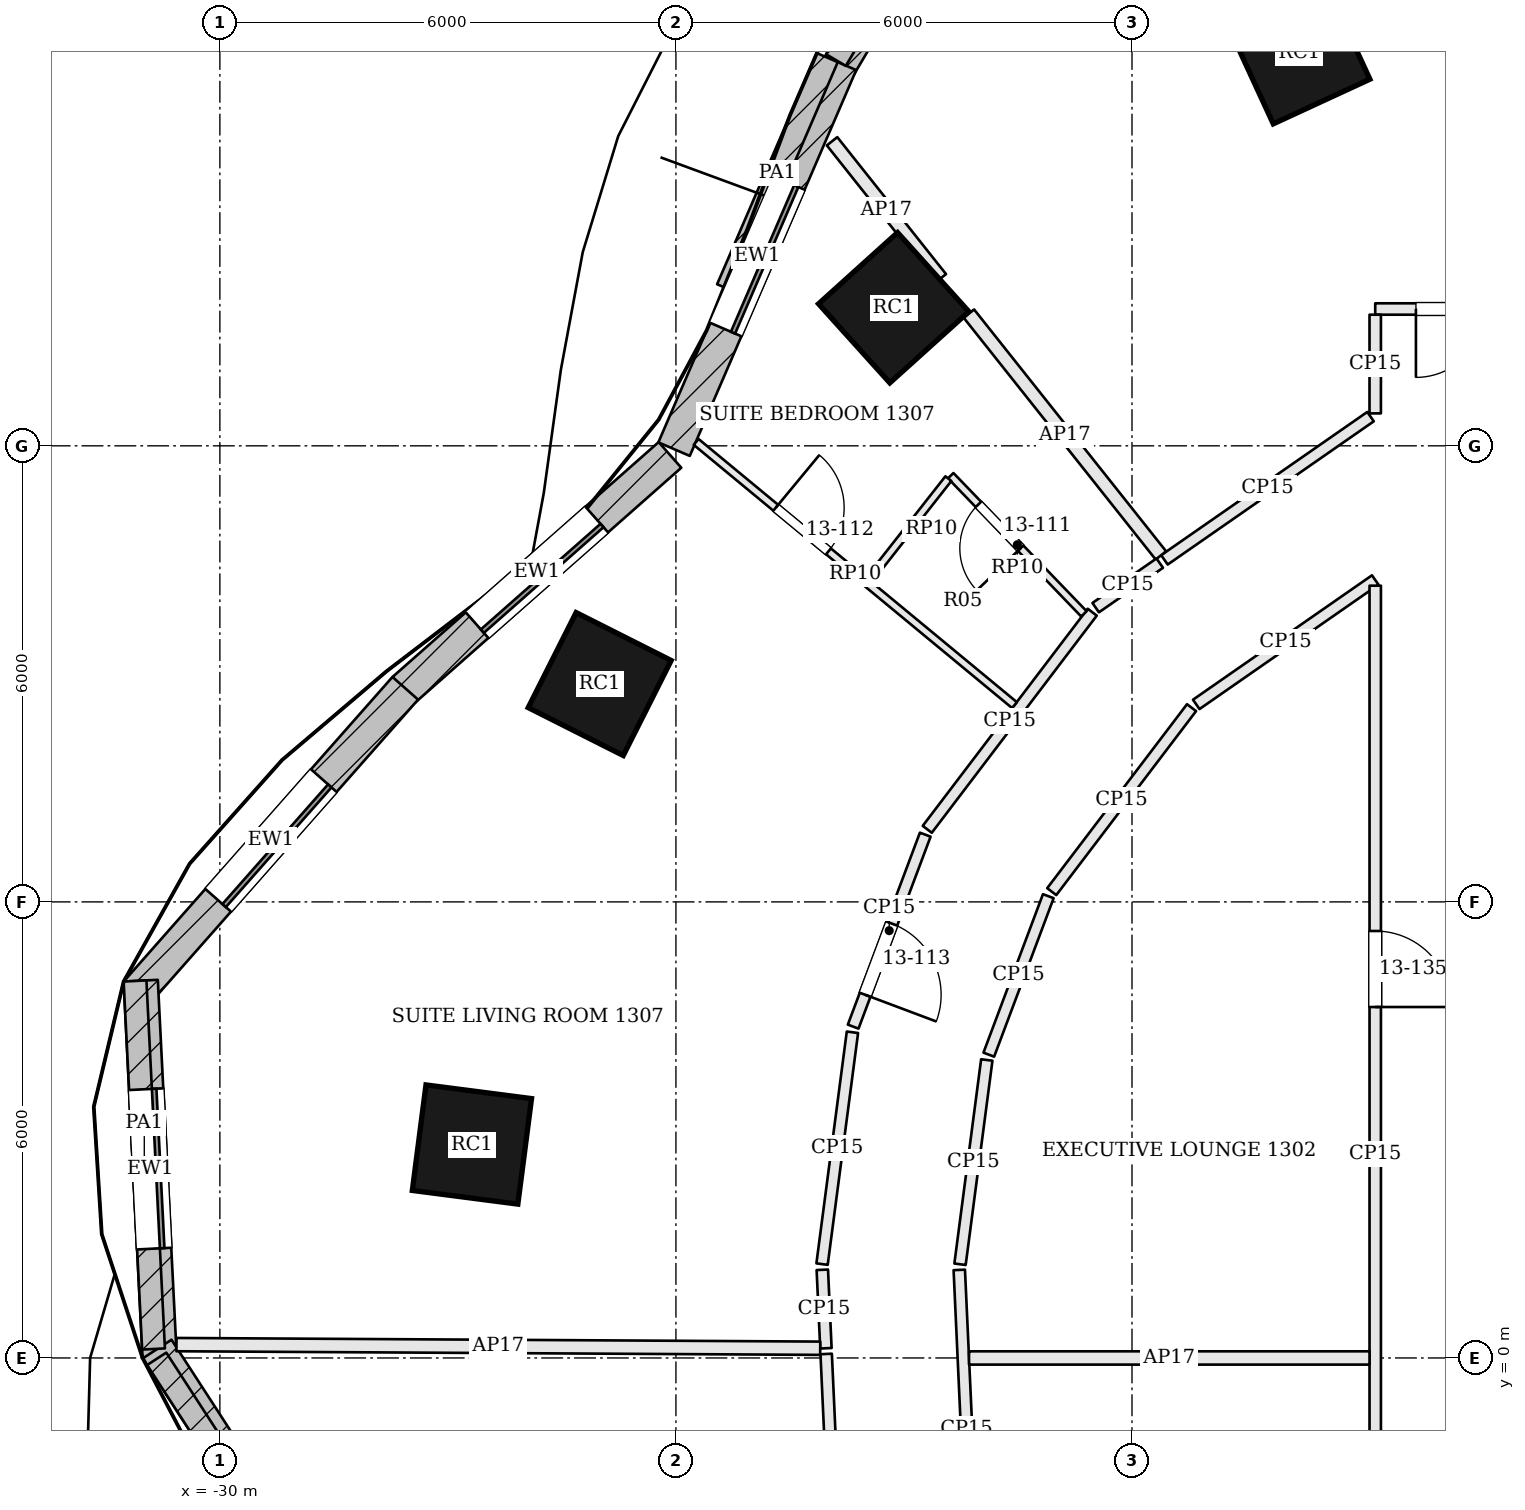
"""IFC4 building model, lengths in metres.
Left out: names, types, materials, properties, quantities, classifications, styles, units other than length and angle.
Written with IfcOpenShell. Run it as: python <this file> out.ifc"""

import sys

from ifc_helpers import new_model, si_unit, direction, frame, frame_2d, origin, origin_2d, place, context, subcontext, project, spatial, rectangle, extrude, element, fill, save


model = new_model("IFC4")
c1 = context("Model", 3, precision=1e-05, world=origin(), true_north=direction((0.0, 1.0)))
c2 = subcontext(c1, "Body", "Model", "MODEL_VIEW")
j1 = project(units=[si_unit("LENGTHUNIT", "METRE"), si_unit("PLANEANGLEUNIT", "RADIAN")], contexts=[c1])
p1 = place(None, origin())
s1 = spatial("IfcSite", under=j1, at=p1, CompositionType="ELEMENT")
p2 = place(p1, origin())
s2 = spatial("IfcBuilding", under=s1, at=p2, CompositionType="ELEMENT")
p3 = place(p2, frame((0.0, 0.0, 62.7)))
s3 = spatial("IfcBuildingStorey", under=s2, at=p3, CompositionType="ELEMENT", Elevation=62.7)
for number, where, z_axis, x_axis in (
    (1, (-15.799, 17.165, 0.0), (0.0, 0.0, 1.0), (-0.908, -0.419, 0.0)),
    (2, (-21.135, 13.817, 0.0), (0.0, 0.0, 1.0), (-0.743, -0.67, 0.0)),
    (3, (-25.003, 8.866, 0.0), (0.0, 0.0, 1.0), (-0.45, -0.893, 0.0)),
    (4, (-26.684, 2.808, 0.0), (0.0, 0.0, 1.0), (-0.128, -0.992, 0.0)),
):
    element("IfcColumn", number, at=place(p3, frame(where, z_axis=z_axis, x_axis=x_axis)), inside=s3, PredefinedType="COLUMN", context=c2, shape_type="SweptSolid", body=[
        extrude(rectangle(XDim=1.4, YDim=1.4, at=origin_2d()), origin(), (0.0, 0.0, 1.0), 3.6),
    ])
p4 = place(p3, frame((-20.017, 20.096, 0.0), z_axis=(0.0, 0.0, 1.0), x_axis=(-0.509718522454, -0.860341227576, 0.0)))
e5 = element("IfcWall", 5, at=p4, inside=s3, PredefinedType="SOLIDWALL", context=c2, shape_type="SweptSolid", body=[
    extrude(rectangle(XDim=3.591, YDim=0.45, at=frame_2d((1.795, 0.0))), origin(), (0.0, 0.0, 1.0), 3.4),
])
p5 = place(p4, frame((0.896, 0.0, 0.9)))
e6 = element("IfcOpeningElement", 6, at=p5, cuts=e5, PredefinedType="OPENING", context=c2, shape_type="SweptSolid", body=[
    extrude(rectangle(XDim=1.8, YDim=2.0, at=frame_2d((0.9, 1.0))), frame((0.0, 0.235, 0.0), z_axis=(0.0, -1.0, 0.0), x_axis=(1.0, 0.0, 0.0)), (0.0, 0.0, 1.0), 0.47),
])
p6 = place(p3, frame((-21.835, 17.032, 0.0), z_axis=(0.0, 0.0, 1.0), x_axis=(-0.396103523022, -0.918205858753, 0.0)))
e7 = element("IfcWall", 7, at=p6, inside=s3, PredefinedType="SOLIDWALL", context=c2, shape_type="SweptSolid", body=[
    extrude(rectangle(XDim=5.528, YDim=0.45, at=frame_2d((2.764, 0.0))), origin(), (0.0, 0.0, 1.0), 3.4),
])
p7 = place(p6, frame((1.714, 0.0, 0.9)))
e8 = element("IfcOpeningElement", 8, at=p7, cuts=e7, PredefinedType="OPENING", context=c2, shape_type="SweptSolid", body=[
    extrude(rectangle(XDim=2.1, YDim=2.0, at=frame_2d((1.05, 1.0))), frame((0.0, 0.235, 0.0), z_axis=(0.0, -1.0, 0.0), x_axis=(1.0, 0.0, 0.0)), (0.0, 0.0, 1.0), 0.47),
])
p8 = place(p3, frame((-24.078, 11.88, 0.0), z_axis=(0.0, 0.0, 1.0), x_axis=(-0.749778352475, -0.661689067583, 0.0)))
e9 = element("IfcWall", 9, at=p8, inside=s3, PredefinedType="SOLIDWALL", context=c2, shape_type="SweptSolid", body=[
    extrude(rectangle(XDim=4.67, YDim=0.45, at=frame_2d((2.335, 0.0))), origin(), (0.0, 0.0, 1.0), 3.4),
])
p9 = place(p8, frame((1.285, 0.0, 0.9)))
e10 = element("IfcOpeningElement", 10, at=p9, cuts=e9, PredefinedType="OPENING", context=c2, shape_type="SweptSolid", body=[
    extrude(rectangle(XDim=2.1, YDim=2.0, at=frame_2d((1.05, 1.0))), frame((0.0, 0.235, 0.0), z_axis=(0.0, -1.0, 0.0), x_axis=(1.0, 0.0, 0.0)), (0.0, 0.0, 1.0), 0.47),
])
p10 = place(p3, frame((-27.561, 8.81, 0.0), z_axis=(0.0, 0.0, 1.0), x_axis=(-0.661706312809, -0.749763132989, 0.0)))
e11 = element("IfcWall", 11, at=p10, inside=s3, PredefinedType="SOLIDWALL", context=c2, shape_type="SweptSolid", body=[
    extrude(rectangle(XDim=5.34, YDim=0.45, at=frame_2d((2.67, 0.0))), origin(), (0.0, 0.0, 1.0), 3.4),
])
p11 = place(p10, frame((1.62, 0.0, 0.9)))
e12 = element("IfcOpeningElement", 12, at=p11, cuts=e11, PredefinedType="OPENING", context=c2, shape_type="SweptSolid", body=[
    extrude(rectangle(XDim=2.1, YDim=2.0, at=frame_2d((1.05, 1.0))), frame((0.0, 0.235, 0.0), z_axis=(0.0, -1.0, 0.0), x_axis=(1.0, 0.0, 0.0)), (0.0, 0.0, 1.0), 0.47),
])
p12 = place(p3, frame((-31.041, 4.963, 0.0), z_axis=(0.0, 0.0, 1.0), x_axis=(0.050222481563, -0.99873805492, 0.0)))
e13 = element("IfcWall", 13, at=p12, inside=s3, PredefinedType="SOLIDWALL", context=c2, shape_type="SweptSolid", body=[
    extrude(rectangle(XDim=4.958, YDim=0.45, at=frame_2d((2.479, 0.0))), origin(), (0.0, 0.0, 1.0), 3.4),
])
p13 = place(p12, frame((1.429, 0.0, 0.9)))
e14 = element("IfcOpeningElement", 14, at=p13, cuts=e13, PredefinedType="OPENING", context=c2, shape_type="SweptSolid", body=[
    extrude(rectangle(XDim=2.1, YDim=2.0, at=frame_2d((1.05, 1.0))), frame((0.0, 0.235, 0.0), z_axis=(0.0, -1.0, 0.0), x_axis=(1.0, 0.0, 0.0)), (0.0, 0.0, 1.0), 0.47),
])
p14 = place(p3, frame((-30.825, 0.117, 0.0), z_axis=(0.0, 0.0, 1.0), x_axis=(0.543975629516, -0.839101015666, 0.0)))
e15 = element("IfcWall", 15, at=p14, inside=s3, PredefinedType="SOLIDWALL", context=c2, shape_type="SweptSolid", body=[
    extrude(rectangle(XDim=5.281, YDim=0.45, at=frame_2d((2.641, 0.0))), origin(), (0.0, 0.0, 1.0), 3.4),
])
p15 = place(p14, frame((1.591, 0.0, 0.9)))
e16 = element("IfcOpeningElement", 16, at=p15, cuts=e15, PredefinedType="OPENING", context=c2, shape_type="SweptSolid", body=[
    extrude(rectangle(XDim=2.1, YDim=2.0, at=frame_2d((1.05, 1.0))), frame((0.0, 0.235, 0.0), z_axis=(0.0, -1.0, 0.0), x_axis=(1.0, 0.0, 0.0)), (0.0, 0.0, 1.0), 0.47),
])
p16 = place(p3, frame((-20.148, 20.023, 3.6), z_axis=(0.0, 0.0, 1.0), x_axis=(-0.509657876052, -0.860377155309, 0.0)))
e17 = element("IfcWall", 17, at=p16, inside=s3, PredefinedType="PARAPET", context=c2, shape_type="SweptSolid", body=[
    extrude(rectangle(XDim=3.427, YDim=0.3, at=frame_2d((1.713, 0.0))), origin(), (0.0, 0.0, 1.0), 1.1),
])
p17 = place(p3, frame((-22.009, 17.107, 3.6), z_axis=(0.0, 0.0, 1.0), x_axis=(-0.396142292889, -0.918189132905, 0.0)))
e18 = element("IfcWall", 18, at=p17, inside=s3, PredefinedType="PARAPET", context=c2, shape_type="SweptSolid", body=[
    extrude(rectangle(XDim=3.312, YDim=0.3, at=frame_2d((1.656, 0.0))), origin(), (0.0, 0.0, 1.0), 1.1),
])
p18 = place(p3, frame((-31.116, 4.959, 3.6), z_axis=(0.0, 0.0, 1.0), x_axis=(0.05021140618, -0.998738611795, 0.0)))
e19 = element("IfcWall", 19, at=p18, inside=s3, PredefinedType="PARAPET", context=c2, shape_type="SweptSolid", body=[
    extrude(rectangle(XDim=4.848, YDim=0.3, at=frame_2d((2.424, 0.0))), origin(), (0.0, 0.0, 1.0), 1.1),
])
p19 = place(p3, frame((-30.831, -0.011, 3.6), z_axis=(0.0, 0.0, 1.0), x_axis=(0.543918219167, -0.839138231079, 0.0)))
e20 = element("IfcWall", 20, at=p19, inside=s3, PredefinedType="PARAPET", context=c2, shape_type="SweptSolid", body=[
    extrude(rectangle(XDim=5.174, YDim=0.3, at=frame_2d((2.587, 0.0))), origin(), (0.0, 0.0, 1.0), 1.1),
])
p20 = place(p3, frame((-11.464, 13.8, 0.0), z_axis=(0.0, 0.0, 1.0), x_axis=(-1.0, 0.0, 0.0)))
e21 = element("IfcWall", 21, at=p20, inside=s3, PredefinedType="PARTITIONING", context=c2, shape_type="SweptSolid", body=[
    extrude(rectangle(XDim=3.336, YDim=0.15, at=frame_2d((1.668, 0.0))), origin(), (0.0, 0.0, 1.0), 2.68),
])
p21 = place(p20, frame((1.0, 0.0, 0.0)))
e22 = element("IfcOpeningElement", 22, at=p21, cuts=e21, PredefinedType="OPENING", context=c2, shape_type="SweptSolid", body=[
    extrude(rectangle(XDim=1.8, YDim=2.1, at=frame_2d((0.9, 1.05))), frame((0.0, 0.085, 0.0), z_axis=(0.0, -1.0, 0.0), x_axis=(1.0, 0.0, 0.0)), (0.0, 0.0, 1.0), 0.17),
])
p22 = place(p3, frame((-14.8, 13.725, 0.0), z_axis=(0.0, 0.0, 1.0), x_axis=(-0.000188040613, -0.99999998232, 0.0)))
e23 = element("IfcWall", 23, at=p22, inside=s3, PredefinedType="PARTITIONING", context=c2, shape_type="SweptSolid", body=[
    extrude(rectangle(XDim=1.298, YDim=0.15, at=frame_2d((0.649, 0.0))), origin(), (0.0, 0.0, 1.0), 2.68),
])
p23 = place(p3, frame((-14.862, 12.384, 0.0), z_axis=(0.0, 0.0, 1.0), x_axis=(-0.821144742038, -0.570719994939, 0.0)))
e24 = element("IfcWall", 24, at=p23, inside=s3, PredefinedType="PARTITIONING", context=c2, shape_type="SweptSolid", body=[
    extrude(rectangle(XDim=3.302, YDim=0.15, at=frame_2d((1.651, 0.0))), origin(), (0.0, 0.0, 1.0), 2.68),
])
p24 = place(p3, frame((-21.946, 16.007, 0.0), z_axis=(0.0, 0.0, 1.0), x_axis=(0.621870662711, -0.783119964539, 0.0)))
e25 = element("IfcWall", 25, at=p24, inside=s3, PredefinedType="PARTITIONING", context=c2, shape_type="SweptSolid", body=[
    extrude(rectangle(XDim=2.301, YDim=0.175, at=frame_2d((1.151, 0.0))), origin(), (0.0, 0.0, 1.0), 2.68),
])
p25 = place(p3, frame((-20.146, 13.74, 0.0), z_axis=(0.0, 0.0, 1.0), x_axis=(0.621832273855, -0.783150447355, 0.0)))
e26 = element("IfcWall", 26, at=p25, inside=s3, PredefinedType="PARTITIONING", context=c2, shape_type="SweptSolid", body=[
    extrude(rectangle(XDim=4.062, YDim=0.175, at=frame_2d((2.031, 0.0))), origin(), (0.0, 0.0, 1.0), 2.68),
])
p26 = place(p3, frame((-17.635, 10.457, 0.0), z_axis=(0.0, 0.0, 1.0), x_axis=(-0.821171783561, -0.570681085969, 0.0)))
e27 = element("IfcWall", 27, at=p26, inside=s3, PredefinedType="PARTITIONING", context=c2, shape_type="SweptSolid", body=[
    extrude(rectangle(XDim=1.026, YDim=0.15, at=frame_2d((0.513, 0.0))), origin(), (0.0, 0.0, 1.0), 2.68),
])
p27 = place(p3, frame((-18.523, 9.811, 0.0), z_axis=(0.0, 0.0, 1.0), x_axis=(-0.605040130963, -0.796194976073, 0.0)))
e28 = element("IfcWall", 28, at=p27, inside=s3, PredefinedType="PARTITIONING", context=c2, shape_type="SweptSolid", body=[
    extrude(rectangle(XDim=3.588, YDim=0.15, at=frame_2d((1.794, 0.0))), origin(), (0.0, 0.0, 1.0), 2.68),
])
p28 = place(p3, frame((-20.72, 6.885, 0.0), z_axis=(0.0, 0.0, 1.0), x_axis=(-0.351520142875, -0.936180318717, 0.0)))
e29 = element("IfcWall", 29, at=p28, inside=s3, PredefinedType="PARTITIONING", context=c2, shape_type="SweptSolid", body=[
    extrude(rectangle(XDim=2.698, YDim=0.15, at=frame_2d((1.349, 0.0))), origin(), (0.0, 0.0, 1.0), 2.68),
])
p29 = place(p28, frame((1.25, 0.0, 0.0)))
e30 = element("IfcOpeningElement", 30, at=p29, cuts=e29, PredefinedType="OPENING", context=c2, shape_type="SweptSolid", body=[
    extrude(rectangle(XDim=1.0, YDim=2.1, at=frame_2d((0.5, 1.05))), frame((0.0, 0.085, 0.0), z_axis=(0.0, -1.0, 0.0), x_axis=(1.0, 0.0, 0.0)), (0.0, 0.0, 1.0), 0.17),
])
p30 = place(p3, frame((-21.678, 4.285, 0.0), z_axis=(0.0, 0.0, 1.0), x_axis=(-0.129922755307, -0.991524118543, 0.0)))
e31 = element("IfcWall", 31, at=p30, inside=s3, PredefinedType="PARTITIONING", context=c2, shape_type="SweptSolid", body=[
    extrude(rectangle(XDim=3.076, YDim=0.15, at=frame_2d((1.538, 0.0))), origin(), (0.0, 0.0, 1.0), 2.68),
])
p31 = place(p3, frame((-22.074, 1.16, 0.0), z_axis=(0.0, 0.0, 1.0), x_axis=(0.045825536747, -0.998949458272, 0.0)))
e32 = element("IfcWall", 32, at=p31, inside=s3, PredefinedType="PARTITIONING", context=c2, shape_type="SweptSolid", body=[
    extrude(rectangle(XDim=1.033, YDim=0.15, at=frame_2d((0.517, 0.0))), origin(), (0.0, 0.0, 1.0), 2.68),
])
p32 = place(p3, frame((-30.571, 0.176, 0.0), z_axis=(0.0, 0.0, 1.0), x_axis=(0.999984039808, -0.005649790199, 0.0)))
e33 = element("IfcWall", 33, at=p32, inside=s3, PredefinedType="PARTITIONING", context=c2, shape_type="SweptSolid", body=[
    extrude(rectangle(XDim=8.47, YDim=0.175, at=frame_2d((4.235, 0.0))), origin(), (0.0, 0.0, 1.0), 2.68),
])
p33 = place(p3, frame((-22.023, 0.052, 0.0), z_axis=(0.0, 0.0, 1.0), x_axis=(0.045873278226, -0.998947267049, 0.0)))
e34 = element("IfcWall", 34, at=p33, inside=s3, PredefinedType="PARTITIONING", context=c2, shape_type="SweptSolid", body=[
    extrude(rectangle(XDim=3.449, YDim=0.15, at=frame_2d((1.724, 0.0))), origin(), (0.0, 0.0, 1.0), 2.68),
])
p34 = place(p3, frame((-20.08, -3.025, 0.0), z_axis=(0.0, 0.0, 1.0), x_axis=(-0.04581750387, 0.998949826738, 0.0)))
e35 = element("IfcWall", 35, at=p34, inside=s3, PredefinedType="PARTITIONING", context=c2, shape_type="SweptSolid", body=[
    extrude(rectangle(XDim=4.188, YDim=0.15, at=frame_2d((2.094, 0.0))), origin(), (0.0, 0.0, 1.0), 2.68),
])
p35 = place(p3, frame((-20.262, 1.233, 0.0), z_axis=(0.0, 0.0, 1.0), x_axis=(0.129897568593, 0.991527418518, 0.0)))
e36 = element("IfcWall", 36, at=p35, inside=s3, PredefinedType="PARTITIONING", context=c2, shape_type="SweptSolid", body=[
    extrude(rectangle(XDim=2.71, YDim=0.15, at=frame_2d((1.355, 0.0))), origin(), (0.0, 0.0, 1.0), 2.68),
])
p36 = place(p3, frame((-19.884, 3.99, 0.0), z_axis=(0.0, 0.0, 1.0), x_axis=(0.351423736928, 0.936216511884, 0.0)))
e37 = element("IfcWall", 37, at=p36, inside=s3, PredefinedType="PARTITIONING", context=c2, shape_type="SweptSolid", body=[
    extrude(rectangle(XDim=2.227, YDim=0.15, at=frame_2d((1.114, 0.0))), origin(), (0.0, 0.0, 1.0), 2.68),
])
p37 = place(p3, frame((-19.056, 6.135, 0.0), z_axis=(0.0, 0.0, 1.0), x_axis=(0.604999774258, 0.796225642107, 0.0)))
e38 = element("IfcWall", 38, at=p37, inside=s3, PredefinedType="PARTITIONING", context=c2, shape_type="SweptSolid", body=[
    extrude(rectangle(XDim=3.04, YDim=0.15, at=frame_2d((1.52, 0.0))), origin(), (0.0, 0.0, 1.0), 2.68),
])
p38 = place(p3, frame((-17.155, 8.598, 0.0), z_axis=(0.0, 0.0, 1.0), x_axis=(0.821087350938, 0.570802559673, 0.0)))
e39 = element("IfcWall", 39, at=p38, inside=s3, PredefinedType="PARTITIONING", context=c2, shape_type="SweptSolid", body=[
    extrude(rectangle(XDim=2.868, YDim=0.15, at=frame_2d((1.434, 0.0))), origin(), (0.0, 0.0, 1.0), 2.68),
])
p39 = place(p3, frame((-14.8, 10.16, 0.0), z_axis=(0.0, 0.0, 1.0), x_axis=(0.0, -1.0, 0.0)))
e40 = element("IfcWall", 40, at=p39, inside=s3, PredefinedType="PARTITIONING", context=c2, shape_type="SweptSolid", body=[
    extrude(rectangle(XDim=14.96, YDim=0.15, at=frame_2d((7.48, 0.0))), origin(), (0.0, 0.0, 1.0), 2.68),
])
p40 = place(p39, frame((4.543, 0.0, 0.0)))
e41 = element("IfcOpeningElement", 41, at=p40, cuts=e40, PredefinedType="OPENING", context=c2, shape_type="SweptSolid", body=[
    extrude(rectangle(XDim=1.0, YDim=2.1, at=frame_2d((0.5, 1.05))), frame((0.0, 0.085, 0.0), z_axis=(0.0, -1.0, 0.0), x_axis=(1.0, 0.0, 0.0)), (0.0, 0.0, 1.0), 0.17),
])
p41 = place(p3, frame((-23.734, 12.051, 0.0), z_axis=(0.0, 0.0, 1.0), x_axis=(0.770730551599, -0.6371612173, 0.0)))
e42 = element("IfcWall", 42, at=p41, inside=s3, PredefinedType="PARTITIONING", context=c2, shape_type="SweptSolid", body=[
    extrude(rectangle(XDim=5.434, YDim=0.1, at=frame_2d((2.717, 0.0))), origin(), (0.0, 0.0, 1.0), 2.68),
])
p42 = place(p41, frame((1.359, 0.0, 0.0)))
e43 = element("IfcOpeningElement", 43, at=p42, cuts=e42, PredefinedType="OPENING", context=c2, shape_type="SweptSolid", body=[
    extrude(rectangle(XDim=0.9, YDim=2.4, at=frame_2d((0.45, 1.2))), frame((0.0, 0.06, 0.0), z_axis=(0.0, -1.0, 0.0), x_axis=(1.0, 0.0, 0.0)), (0.0, 0.0, 1.0), 0.12),
])
p43 = place(p3, frame((-18.633, 9.789, 0.0), z_axis=(0.0, 0.0, 1.0), x_axis=(-0.693885037795, 0.720085796502, 0.0)))
e44 = element("IfcWall", 44, at=p43, inside=s3, PredefinedType="PARTITIONING", context=c2, shape_type="SweptSolid", body=[
    extrude(rectangle(XDim=2.525, YDim=0.1, at=frame_2d((1.263, 0.0))), origin(), (0.0, 0.0, 1.0), 2.68),
])
p44 = place(p43, frame((1.2, 0.0, 0.0)))
e45 = element("IfcOpeningElement", 45, at=p44, cuts=e44, PredefinedType="OPENING", context=c2, shape_type="SweptSolid", body=[
    extrude(rectangle(XDim=0.8, YDim=2.1, at=frame_2d((0.4, 1.05))), frame((0.0, 0.06, 0.0), z_axis=(0.0, -1.0, 0.0), x_axis=(1.0, 0.0, 0.0)), (0.0, 0.0, 1.0), 0.12),
])
p45 = place(p3, frame((-20.416, 11.568, 0.0), z_axis=(0.0, 0.0, 1.0), x_axis=(-0.617598582762, -0.786493477767, 0.0)))
e46 = element("IfcWall", 46, at=p45, inside=s3, PredefinedType="PARTITIONING", context=c2, shape_type="SweptSolid", body=[
    extrude(rectangle(XDim=1.693, YDim=0.1, at=frame_2d((0.846, 0.0))), origin(), (0.0, 0.0, 1.0), 2.68),
])
p46 = place(p3, frame((-20.144, 0.0, 0.0), z_axis=(0.0, 0.0, 1.0), x_axis=(1.0, 0.0, 0.0)))
e47 = element("IfcWall", 47, at=p46, inside=s3, PredefinedType="PARTITIONING", context=c2, shape_type="SweptSolid", body=[
    extrude(rectangle(XDim=5.269, YDim=0.175, at=frame_2d((2.635, 0.0))), origin(), (0.0, 0.0, 1.0), 2.68),
])
p47 = place(p7, origin())
e48 = element("IfcWindow", 48, at=p47, inside=s3, PartitioningType="SINGLE_PANEL", PredefinedType="WINDOW", context=c2, shape_type="SweptSolid", body=[
    extrude(rectangle(XDim=2.1, YDim=2.0, at=frame_2d((1.05, 1.0))), frame((0.0, 0.135, 0.0), z_axis=(0.0, -1.0, 0.0), x_axis=(1.0, 0.0, 0.0)), (0.0, 0.0, 1.0), 0.06),
])
fill(e8, e48)
p48 = place(p9, origin())
e49 = element("IfcWindow", 49, at=p48, inside=s3, PartitioningType="SINGLE_PANEL", PredefinedType="WINDOW", context=c2, shape_type="SweptSolid", body=[
    extrude(rectangle(XDim=2.1, YDim=2.0, at=frame_2d((1.05, 1.0))), frame((0.0, 0.135, 0.0), z_axis=(0.0, -1.0, 0.0), x_axis=(1.0, 0.0, 0.0)), (0.0, 0.0, 1.0), 0.06),
])
fill(e10, e49)
p49 = place(p11, origin())
e50 = element("IfcWindow", 50, at=p49, inside=s3, PartitioningType="SINGLE_PANEL", PredefinedType="WINDOW", context=c2, shape_type="SweptSolid", body=[
    extrude(rectangle(XDim=2.1, YDim=2.0, at=frame_2d((1.05, 1.0))), frame((0.0, 0.135, 0.0), z_axis=(0.0, -1.0, 0.0), x_axis=(1.0, 0.0, 0.0)), (0.0, 0.0, 1.0), 0.06),
])
fill(e12, e50)
p50 = place(p13, origin())
e51 = element("IfcWindow", 51, at=p50, inside=s3, PartitioningType="SINGLE_PANEL", PredefinedType="WINDOW", context=c2, shape_type="SweptSolid", body=[
    extrude(rectangle(XDim=2.1, YDim=2.0, at=frame_2d((1.05, 1.0))), frame((0.0, 0.135, 0.0), z_axis=(0.0, -1.0, 0.0), x_axis=(1.0, 0.0, 0.0)), (0.0, 0.0, 1.0), 0.06),
])
fill(e14, e51)
p51 = place(p21, origin())
e52 = element("IfcDoor", 52, at=p51, inside=s3, OperationType="DOUBLE_DOOR_SINGLE_SWING", PredefinedType="DOOR", context=c2, shape_type="SweptSolid", body=[
    extrude(rectangle(XDim=1.8, YDim=2.1, at=frame_2d((0.9, 1.05))), frame((0.0, 0.025, 0.0), z_axis=(0.0, -1.0, 0.0), x_axis=(1.0, 0.0, 0.0)), (0.0, 0.0, 1.0), 0.05),
])
fill(e22, e52)
p52 = place(p44, origin())
e53 = element("IfcDoor", 53, at=p52, inside=s3, OperationType="SINGLE_SWING_LEFT", PredefinedType="DOOR", context=c2, shape_type="SweptSolid", body=[
    extrude(rectangle(XDim=0.8, YDim=2.1, at=frame_2d((0.4, 1.05))), frame((0.0, 0.025, 0.0), z_axis=(0.0, -1.0, 0.0), x_axis=(1.0, 0.0, 0.0)), (0.0, 0.0, 1.0), 0.05),
])
fill(e45, e53)
p53 = place(p42, origin())
e54 = element("IfcDoor", 54, at=p53, inside=s3, OperationType="SINGLE_SWING_LEFT", PredefinedType="DOOR", context=c2, shape_type="SweptSolid", body=[
    extrude(rectangle(XDim=0.9, YDim=2.4, at=frame_2d((0.45, 1.2))), frame((0.0, 0.025, 0.0), z_axis=(0.0, -1.0, 0.0), x_axis=(1.0, 0.0, 0.0)), (0.0, 0.0, 1.0), 0.05),
])
fill(e43, e54)
p54 = place(p29, origin())
e55 = element("IfcDoor", 55, at=p54, inside=s3, OperationType="SINGLE_SWING_RIGHT", PredefinedType="DOOR", context=c2, shape_type="SweptSolid", body=[
    extrude(rectangle(XDim=1.0, YDim=2.1, at=frame_2d((0.5, 1.05))), frame((0.0, 0.025, 0.0), z_axis=(0.0, -1.0, 0.0), x_axis=(1.0, 0.0, 0.0)), (0.0, 0.0, 1.0), 0.05),
])
fill(e30, e55)
p55 = place(p40, origin())
e56 = element("IfcDoor", 56, at=p55, inside=s3, OperationType="SINGLE_SWING_RIGHT", PredefinedType="DOOR", context=c2, shape_type="SweptSolid", body=[
    extrude(rectangle(XDim=1.0, YDim=2.1, at=frame_2d((0.5, 1.05))), frame((0.0, 0.025, 0.0), z_axis=(0.0, -1.0, 0.0), x_axis=(1.0, 0.0, 0.0)), (0.0, 0.0, 1.0), 0.05),
])
fill(e41, e56)
save(model, sys.argv[1])
